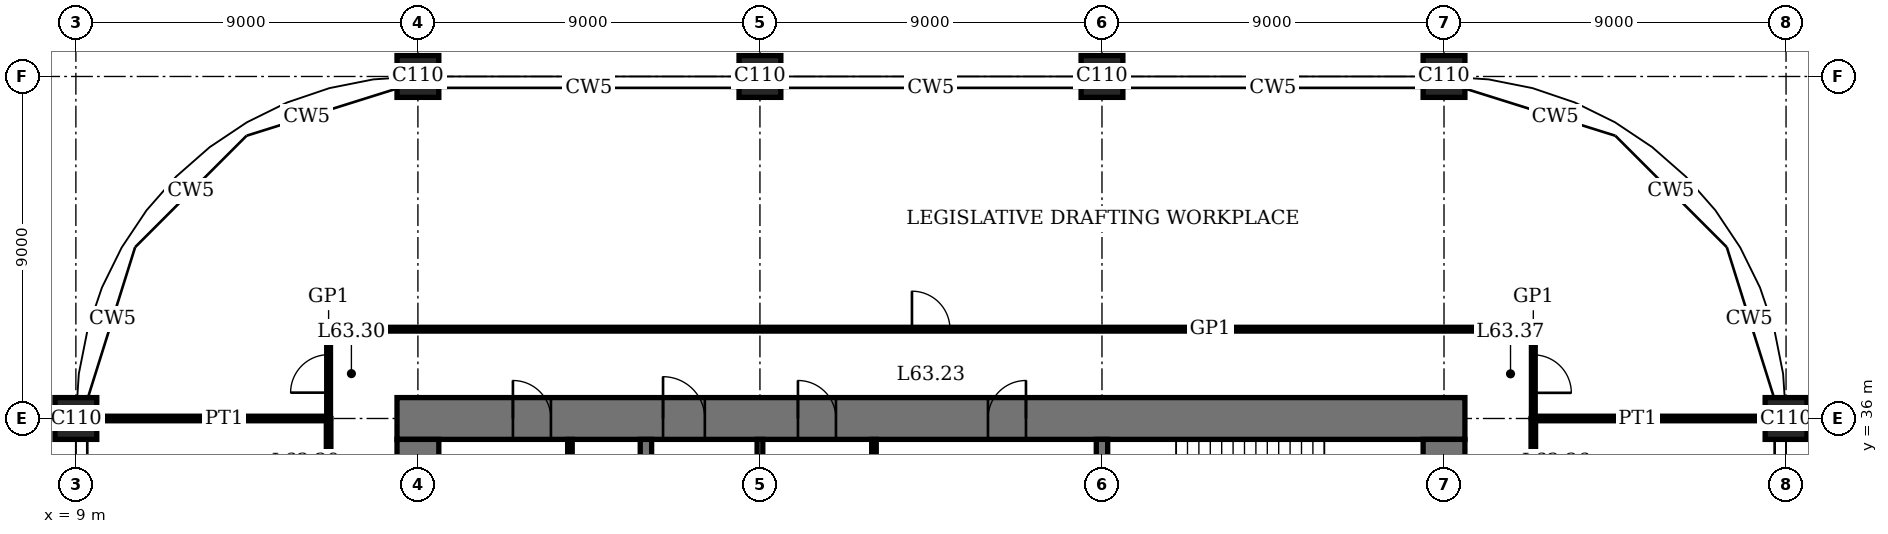
"""IFC4 building model, lengths in metres.
Left out: names, types, materials, properties, quantities, classifications, styles, units other than length and angle.
Written with IfcOpenShell. Run it as: python <this file> out.ifc"""

import sys

from ifc_helpers import new_model, si_unit, direction, frame, frame_2d, origin, origin_2d, place, context, subcontext, project, spatial, rectangle, extrude, element, fill, save


model = new_model("IFC4")
c1 = context("Model", 3, precision=1e-05, world=origin(), true_north=direction((0.0, 1.0)))
c2 = subcontext(c1, "Body", "Model", "MODEL_VIEW")
j1 = project(units=[si_unit("LENGTHUNIT", "METRE"), si_unit("PLANEANGLEUNIT", "RADIAN")], contexts=[c1])
p1 = place(None, origin())
s1 = spatial("IfcSite", under=j1, at=p1, CompositionType="ELEMENT")
p2 = place(p1, origin())
s2 = spatial("IfcBuilding", under=s1, at=p2, CompositionType="ELEMENT")
p3 = place(p2, frame((0.0, 0.0, 259.4)))
s3 = spatial("IfcBuildingStorey", under=s2, at=p3, CompositionType="ELEMENT", Elevation=259.4)
for number, where, z_axis, x_axis in (
    (1, (9.0, 36.0, 0.0), (0.0, 0.0, 1.0), (1.0, 0.0, 0.0)),
    (2, (18.0, 45.0, 0.0), (0.0, 0.0, 1.0), (1.0, 0.0, 0.0)),
    (3, (27.0, 45.0, 0.0), (0.0, 0.0, 1.0), (1.0, 0.0, 0.0)),
    (4, (36.0, 45.0, 0.0), (0.0, 0.0, 1.0), (1.0, 0.0, 0.0)),
    (5, (45.0, 45.0, 0.0), (0.0, 0.0, 1.0), (1.0, 0.0, 0.0)),
    (6, (54.0, 36.0, 0.0), (0.0, 0.0, 1.0), (1.0, 0.0, 0.0)),
):
    element("IfcColumn", number, at=place(p3, frame(where, z_axis=z_axis, x_axis=x_axis)), inside=s3, PredefinedType="COLUMN", context=c2, shape_type="SweptSolid", body=[
        extrude(rectangle(XDim=1.1, YDim=1.1, at=origin_2d()), origin(), (0.0, 0.0, 1.0), 4.0),
    ])
p4 = place(p3, frame((45.55, 36.0, 0.0), z_axis=(0.0, 0.0, 1.0), x_axis=(-1.0, 0.0, 0.0)))
e7 = element("IfcWall", 7, at=p4, inside=s3, PredefinedType="SHEAR", context=c2, shape_type="SweptSolid", body=[
    extrude(rectangle(XDim=28.1, YDim=1.1, at=frame_2d((14.05, 0.0))), origin(), (0.0, 0.0, 1.0), 4.0),
])
p5 = place(p4, frame((11.55, 0.0, 0.0)))
e8 = element("IfcOpeningElement", 8, at=p5, cuts=e7, PredefinedType="OPENING", context=c2, shape_type="SweptSolid", body=[
    extrude(rectangle(XDim=1.0, YDim=2.4, at=frame_2d((0.5, 1.2))), frame((0.0, 0.56, 0.0), z_axis=(0.0, -1.0, 0.0), x_axis=(1.0, 0.0, 0.0)), (0.0, 0.0, 1.0), 1.12),
])
p6 = place(p4, frame((16.55, 0.0, 0.0)))
e9 = element("IfcOpeningElement", 9, at=p6, cuts=e7, PredefinedType="OPENING", context=c2, shape_type="SweptSolid", body=[
    extrude(rectangle(XDim=1.0, YDim=2.4, at=frame_2d((0.5, 1.2))), frame((0.0, 0.56, 0.0), z_axis=(0.0, -1.0, 0.0), x_axis=(1.0, 0.0, 0.0)), (0.0, 0.0, 1.0), 1.12),
])
p7 = place(p4, frame((20.0, 0.0, 0.0)))
e10 = element("IfcOpeningElement", 10, at=p7, cuts=e7, PredefinedType="OPENING", context=c2, shape_type="SweptSolid", body=[
    extrude(rectangle(XDim=1.1, YDim=2.4, at=frame_2d((0.55, 1.2))), frame((0.0, 0.56, 0.0), z_axis=(0.0, -1.0, 0.0), x_axis=(1.0, 0.0, 0.0)), (0.0, 0.0, 1.0), 1.12),
])
p8 = place(p4, frame((24.05, 0.0, 0.0)))
e11 = element("IfcOpeningElement", 11, at=p8, cuts=e7, PredefinedType="OPENING", context=c2, shape_type="SweptSolid", body=[
    extrude(rectangle(XDim=1.0, YDim=2.4, at=frame_2d((0.5, 1.2))), frame((0.0, 0.56, 0.0), z_axis=(0.0, -1.0, 0.0), x_axis=(1.0, 0.0, 0.0)), (0.0, 0.0, 1.0), 1.12),
])
p9 = place(p3, frame((18.0, 35.45, 0.0), z_axis=(0.0, 0.0, 1.0), x_axis=(0.0, -1.0, 0.0)))
e12 = element("IfcWall", 12, at=p9, inside=s3, PredefinedType="SHEAR", context=c2, shape_type="SweptSolid", body=[
    extrude(rectangle(XDim=16.9, YDim=1.1, at=frame_2d((8.45, 0.0))), origin(), (0.0, 0.0, 1.0), 4.0),
])
p10 = place(p9, frame((8.45, 0.0, 0.0)))
e13 = element("IfcOpeningElement", 13, at=p10, cuts=e12, PredefinedType="OPENING", context=c2, shape_type="SweptSolid", body=[
    extrude(rectangle(XDim=1.8, YDim=2.4, at=frame_2d((0.9, 1.2))), frame((0.0, 0.56, 0.0), z_axis=(0.0, -1.0, 0.0), x_axis=(1.0, 0.0, 0.0)), (0.0, 0.0, 1.0), 1.12),
])
p11 = place(p3, frame((45.0, 18.55, 0.0), z_axis=(0.0, 0.0, 1.0), x_axis=(0.0, 1.0, 0.0)))
e14 = element("IfcWall", 14, at=p11, inside=s3, PredefinedType="SHEAR", context=c2, shape_type="SweptSolid", body=[
    extrude(rectangle(XDim=16.9, YDim=1.1, at=frame_2d((8.45, 0.0))), origin(), (0.0, 0.0, 1.0), 4.0),
])
p12 = place(p11, frame((8.45, 0.0, 0.0)))
e15 = element("IfcOpeningElement", 15, at=p12, cuts=e14, PredefinedType="OPENING", context=c2, shape_type="SweptSolid", body=[
    extrude(rectangle(XDim=1.8, YDim=2.4, at=frame_2d((0.9, 1.2))), frame((0.0, 0.56, 0.0), z_axis=(0.0, -1.0, 0.0), x_axis=(1.0, 0.0, 0.0)), (0.0, 0.0, 1.0), 1.12),
])
p13 = place(p3, frame((36.0, 32.4, 0.0), z_axis=(0.0, 0.0, 1.0), x_axis=(0.0, 1.0, 0.0)))
e16 = element("IfcWall", 16, at=p13, inside=s3, PredefinedType="SHEAR", context=c2, shape_type="SweptSolid", body=[
    extrude(rectangle(XDim=3.05, YDim=0.3, at=frame_2d((1.525, 0.0))), origin(), (0.0, 0.0, 1.0), 4.0),
])
p14 = place(p3, frame((24.0, 29.55, 0.0), z_axis=(0.0, 0.0, 1.0), x_axis=(0.0, 1.0, 0.0)))
e17 = element("IfcWall", 17, at=p14, inside=s3, PredefinedType="SHEAR", context=c2, shape_type="SweptSolid", body=[
    extrude(rectangle(XDim=5.9, YDim=0.3, at=frame_2d((2.95, 0.0))), origin(), (0.0, 0.0, 1.0), 4.0),
])
for number, where, z_axis, x_axis in (
    (18, (9.55, 36.0, 0.0), (0.0, 0.0, 1.0), (1.0, 0.0, 0.0)),
    (19, (47.35, 36.0, 0.0), (0.0, 0.0, 1.0), (1.0, 0.0, 0.0)),
):
    element("IfcWall", number, at=place(p3, frame(where, z_axis=z_axis, x_axis=x_axis)), inside=s3, PredefinedType="PARTITIONING", context=c2, shape_type="SweptSolid", body=[
        extrude(rectangle(XDim=6.1, YDim=0.12, at=frame_2d((3.05, 0.0))), origin(), (0.0, 0.0, 1.0), 3.05),
    ])
p15 = place(p3, frame((15.6, 38.35, 0.0), z_axis=(0.0, 0.0, 1.0), x_axis=(1.0, 0.0, 0.0)))
e20 = element("IfcWall", 20, at=p15, inside=s3, PredefinedType="PARTITIONING", context=c2, shape_type="SweptSolid", body=[
    extrude(rectangle(XDim=31.8, YDim=0.1, at=frame_2d((15.9, 0.0))), origin(), (0.0, 0.0, 1.0), 3.75),
])
p16 = place(p15, frame((15.4, 0.0, 0.0)))
e21 = element("IfcOpeningElement", 21, at=p16, cuts=e20, PredefinedType="OPENING", context=c2, shape_type="SweptSolid", body=[
    extrude(rectangle(XDim=1.0, YDim=2.4, at=frame_2d((0.5, 1.2))), frame((0.0, 0.06, 0.0), z_axis=(0.0, -1.0, 0.0), x_axis=(1.0, 0.0, 0.0)), (0.0, 0.0, 1.0), 0.12),
])
p17 = place(p3, frame((15.65, 31.5, 0.0), z_axis=(0.0, 0.0, 1.0), x_axis=(0.0, 1.0, 0.0)))
e22 = element("IfcWall", 22, at=p17, inside=s3, PredefinedType="PARTITIONING", context=c2, shape_type="SweptSolid", body=[
    extrude(rectangle(XDim=4.5, YDim=0.12, at=frame_2d((2.25, 0.0))), origin(), (0.0, 0.0, 1.0), 3.75),
])
p18 = place(p17, frame((1.75, 0.0, 0.0)))
e23 = element("IfcOpeningElement", 23, at=p18, cuts=e22, PredefinedType="OPENING", context=c2, shape_type="SweptSolid", body=[
    extrude(rectangle(XDim=1.0, YDim=2.4, at=frame_2d((0.5, 1.2))), frame((0.0, 0.07, 0.0), z_axis=(0.0, -1.0, 0.0), x_axis=(1.0, 0.0, 0.0)), (0.0, 0.0, 1.0), 0.14),
])
p19 = place(p3, frame((15.65, 36.01, 0.0), z_axis=(0.0, 0.0, 1.0), x_axis=(0.0, 1.0, 0.0)))
e24 = element("IfcWall", 24, at=p19, inside=s3, PredefinedType="PARTITIONING", context=c2, shape_type="SweptSolid", body=[
    extrude(rectangle(XDim=2.34, YDim=0.1, at=frame_2d((1.17, 0.0))), origin(), (0.0, 0.0, 1.0), 3.75),
])
p20 = place(p19, frame((0.67, 0.0, 0.0)))
e25 = element("IfcOpeningElement", 25, at=p20, cuts=e24, PredefinedType="OPENING", context=c2, shape_type="SweptSolid", body=[
    extrude(rectangle(XDim=1.0, YDim=2.4, at=frame_2d((0.5, 1.2))), frame((0.0, 0.06, 0.0), z_axis=(0.0, -1.0, 0.0), x_axis=(1.0, 0.0, 0.0)), (0.0, 0.0, 1.0), 0.12),
])
p21 = place(p3, frame((47.35, 31.5, 0.0), z_axis=(0.0, 0.0, 1.0), x_axis=(0.0, 1.0, 0.0)))
e26 = element("IfcWall", 26, at=p21, inside=s3, PredefinedType="PARTITIONING", context=c2, shape_type="SweptSolid", body=[
    extrude(rectangle(XDim=4.5, YDim=0.12, at=frame_2d((2.25, 0.0))), origin(), (0.0, 0.0, 1.0), 3.75),
])
p22 = place(p21, frame((1.75, 0.0, 0.0)))
e27 = element("IfcOpeningElement", 27, at=p22, cuts=e26, PredefinedType="OPENING", context=c2, shape_type="SweptSolid", body=[
    extrude(rectangle(XDim=1.0, YDim=2.4, at=frame_2d((0.5, 1.2))), frame((0.0, 0.07, 0.0), z_axis=(0.0, -1.0, 0.0), x_axis=(1.0, 0.0, 0.0)), (0.0, 0.0, 1.0), 0.14),
])
p23 = place(p3, frame((47.35, 36.0, 0.0), z_axis=(0.0, 0.0, 1.0), x_axis=(0.0, 1.0, 0.0)))
e28 = element("IfcWall", 28, at=p23, inside=s3, PredefinedType="PARTITIONING", context=c2, shape_type="SweptSolid", body=[
    extrude(rectangle(XDim=2.35, YDim=0.1, at=frame_2d((1.175, 0.0))), origin(), (0.0, 0.0, 1.0), 3.75),
])
p24 = place(p23, frame((0.675, 0.0, 0.0)))
e29 = element("IfcOpeningElement", 29, at=p24, cuts=e28, PredefinedType="OPENING", context=c2, shape_type="SweptSolid", body=[
    extrude(rectangle(XDim=1.0, YDim=2.4, at=frame_2d((0.5, 1.2))), frame((0.0, 0.06, 0.0), z_axis=(0.0, -1.0, 0.0), x_axis=(1.0, 0.0, 0.0)), (0.0, 0.0, 1.0), 0.12),
])
p25 = place(p3, frame((30.0, 32.55, 0.0), z_axis=(0.0, 0.0, 1.0), x_axis=(0.0, 1.0, 0.0)))
e30 = element("IfcWall", 30, at=p25, inside=s3, PredefinedType="PARTITIONING", context=c2, shape_type="SweptSolid", body=[
    extrude(rectangle(XDim=2.9, YDim=0.12, at=frame_2d((1.45, 0.0))), origin(), (0.0, 0.0, 1.0), 3.75),
])
p26 = place(p3, frame((27.0, 32.55, 0.0), z_axis=(0.0, 0.0, 1.0), x_axis=(0.0, 1.0, 0.0)))
e31 = element("IfcWall", 31, at=p26, inside=s3, PredefinedType="PARTITIONING", context=c2, shape_type="SweptSolid", body=[
    extrude(rectangle(XDim=2.9, YDim=0.15, at=frame_2d((1.45, 0.0))), origin(), (0.0, 0.0, 1.0), 3.75),
])
p27 = place(p3, frame((22.0, 32.55, 0.0), z_axis=(0.0, 0.0, 1.0), x_axis=(0.0, 1.0, 0.0)))
e32 = element("IfcWall", 32, at=p27, inside=s3, PredefinedType="PARTITIONING", context=c2, shape_type="SweptSolid", body=[
    extrude(rectangle(XDim=2.9, YDim=0.12, at=frame_2d((1.45, 0.0))), origin(), (0.0, 0.0, 1.0), 3.75),
])
p28 = place(p27, frame((0.95, 0.0, 0.0)))
e33 = element("IfcOpeningElement", 33, at=p28, cuts=e32, PredefinedType="OPENING", context=c2, shape_type="SweptSolid", body=[
    extrude(rectangle(XDim=1.0, YDim=2.4, at=frame_2d((0.5, 1.2))), frame((0.0, 0.07, 0.0), z_axis=(0.0, -1.0, 0.0), x_axis=(1.0, 0.0, 0.0)), (0.0, 0.0, 1.0), 0.14),
])
p29 = place(p5, origin())
e34 = element("IfcDoor", 34, at=p29, inside=s3, OperationType="SINGLE_SWING_LEFT", PredefinedType="DOOR", context=c2, shape_type="SweptSolid", body=[
    extrude(rectangle(XDim=1.0, YDim=2.4, at=frame_2d((0.5, 1.2))), frame((0.0, 0.025, 0.0), z_axis=(0.0, -1.0, 0.0), x_axis=(1.0, 0.0, 0.0)), (0.0, 0.0, 1.0), 0.05),
    extrude(rectangle(XDim=0.04, YDim=2.4, at=frame_2d((0.02, 1.2))), frame((0.0, 0.4, 0.0), z_axis=(0.0, -1.0, 0.0), x_axis=(1.0, 0.0, 0.0)), (0.0, 0.0, 1.0), 0.8),
    extrude(rectangle(XDim=0.04, YDim=2.4, at=frame_2d((0.98, 1.2))), frame((0.0, 0.4, 0.0), z_axis=(0.0, -1.0, 0.0), x_axis=(1.0, 0.0, 0.0)), (0.0, 0.0, 1.0), 0.8),
    extrude(rectangle(XDim=1.0, YDim=0.04, at=frame_2d((0.5, 2.38))), frame((0.0, 0.4, 0.0), z_axis=(0.0, -1.0, 0.0), x_axis=(1.0, 0.0, 0.0)), (0.0, 0.0, 1.0), 0.8),
])
fill(e8, e34)
p30 = place(p6, origin())
e35 = element("IfcDoor", 35, at=p30, inside=s3, OperationType="SINGLE_SWING_RIGHT", PredefinedType="DOOR", context=c2, shape_type="SweptSolid", body=[
    extrude(rectangle(XDim=1.0, YDim=2.4, at=frame_2d((0.5, 1.2))), frame((0.0, 0.025, 0.0), z_axis=(0.0, -1.0, 0.0), x_axis=(1.0, 0.0, 0.0)), (0.0, 0.0, 1.0), 0.05),
    extrude(rectangle(XDim=0.04, YDim=2.4, at=frame_2d((0.02, 1.2))), frame((0.0, 0.4, 0.0), z_axis=(0.0, -1.0, 0.0), x_axis=(1.0, 0.0, 0.0)), (0.0, 0.0, 1.0), 0.8),
    extrude(rectangle(XDim=0.04, YDim=2.4, at=frame_2d((0.98, 1.2))), frame((0.0, 0.4, 0.0), z_axis=(0.0, -1.0, 0.0), x_axis=(1.0, 0.0, 0.0)), (0.0, 0.0, 1.0), 0.8),
    extrude(rectangle(XDim=1.0, YDim=0.04, at=frame_2d((0.5, 2.38))), frame((0.0, 0.4, 0.0), z_axis=(0.0, -1.0, 0.0), x_axis=(1.0, 0.0, 0.0)), (0.0, 0.0, 1.0), 0.8),
])
fill(e9, e35)
p31 = place(p7, origin())
e36 = element("IfcDoor", 36, at=p31, inside=s3, OperationType="SINGLE_SWING_RIGHT", PredefinedType="DOOR", context=c2, shape_type="SweptSolid", body=[
    extrude(rectangle(XDim=1.1, YDim=2.4, at=frame_2d((0.55, 1.2))), frame((0.0, 0.025, 0.0), z_axis=(0.0, -1.0, 0.0), x_axis=(1.0, 0.0, 0.0)), (0.0, 0.0, 1.0), 0.05),
    extrude(rectangle(XDim=0.04, YDim=2.4, at=frame_2d((0.02, 1.2))), frame((0.0, 0.44, 0.0), z_axis=(0.0, -1.0, 0.0), x_axis=(1.0, 0.0, 0.0)), (0.0, 0.0, 1.0), 0.88),
    extrude(rectangle(XDim=0.04, YDim=2.4, at=frame_2d((1.08, 1.2))), frame((0.0, 0.44, 0.0), z_axis=(0.0, -1.0, 0.0), x_axis=(1.0, 0.0, 0.0)), (0.0, 0.0, 1.0), 0.88),
    extrude(rectangle(XDim=1.1, YDim=0.04, at=frame_2d((0.55, 2.38))), frame((0.0, 0.44, 0.0), z_axis=(0.0, -1.0, 0.0), x_axis=(1.0, 0.0, 0.0)), (0.0, 0.0, 1.0), 0.88),
])
fill(e10, e36)
p32 = place(p8, origin())
e37 = element("IfcDoor", 37, at=p32, inside=s3, OperationType="SINGLE_SWING_RIGHT", PredefinedType="DOOR", context=c2, shape_type="SweptSolid", body=[
    extrude(rectangle(XDim=1.0, YDim=2.4, at=frame_2d((0.5, 1.2))), frame((0.0, 0.025, 0.0), z_axis=(0.0, -1.0, 0.0), x_axis=(1.0, 0.0, 0.0)), (0.0, 0.0, 1.0), 0.05),
    extrude(rectangle(XDim=0.04, YDim=2.4, at=frame_2d((0.02, 1.2))), frame((0.0, 0.4, 0.0), z_axis=(0.0, -1.0, 0.0), x_axis=(1.0, 0.0, 0.0)), (0.0, 0.0, 1.0), 0.8),
    extrude(rectangle(XDim=0.04, YDim=2.4, at=frame_2d((0.98, 1.2))), frame((0.0, 0.4, 0.0), z_axis=(0.0, -1.0, 0.0), x_axis=(1.0, 0.0, 0.0)), (0.0, 0.0, 1.0), 0.8),
    extrude(rectangle(XDim=1.0, YDim=0.04, at=frame_2d((0.5, 2.38))), frame((0.0, 0.4, 0.0), z_axis=(0.0, -1.0, 0.0), x_axis=(1.0, 0.0, 0.0)), (0.0, 0.0, 1.0), 0.8),
])
fill(e11, e37)
p33 = place(p16, origin())
e38 = element("IfcDoor", 38, at=p33, inside=s3, OperationType="SINGLE_SWING_RIGHT", PredefinedType="DOOR", context=c2, shape_type="SweptSolid", body=[
    extrude(rectangle(XDim=1.0, YDim=2.4, at=frame_2d((0.5, 1.2))), frame((0.0, 0.02, 0.0), z_axis=(0.0, -1.0, 0.0), x_axis=(1.0, 0.0, 0.0)), (0.0, 0.0, 1.0), 0.04),
])
fill(e21, e38)
p34 = place(p20, origin())
e39 = element("IfcDoor", 39, at=p34, inside=s3, OperationType="SINGLE_SWING_RIGHT", PredefinedType="DOOR", context=c2, shape_type="SweptSolid", body=[
    extrude(rectangle(XDim=1.0, YDim=2.4, at=frame_2d((0.5, 1.2))), frame((0.0, 0.02, 0.0), z_axis=(0.0, -1.0, 0.0), x_axis=(1.0, 0.0, 0.0)), (0.0, 0.0, 1.0), 0.04),
])
fill(e25, e39)
p35 = place(p24, origin())
e40 = element("IfcDoor", 40, at=p35, inside=s3, OperationType="SINGLE_SWING_LEFT", PredefinedType="DOOR", context=c2, shape_type="SweptSolid", body=[
    extrude(rectangle(XDim=1.0, YDim=2.4, at=frame_2d((0.5, 1.2))), frame((0.0, 0.02, 0.0), z_axis=(0.0, -1.0, 0.0), x_axis=(1.0, 0.0, 0.0)), (0.0, 0.0, 1.0), 0.04),
])
fill(e29, e40)
save(model, sys.argv[1])
